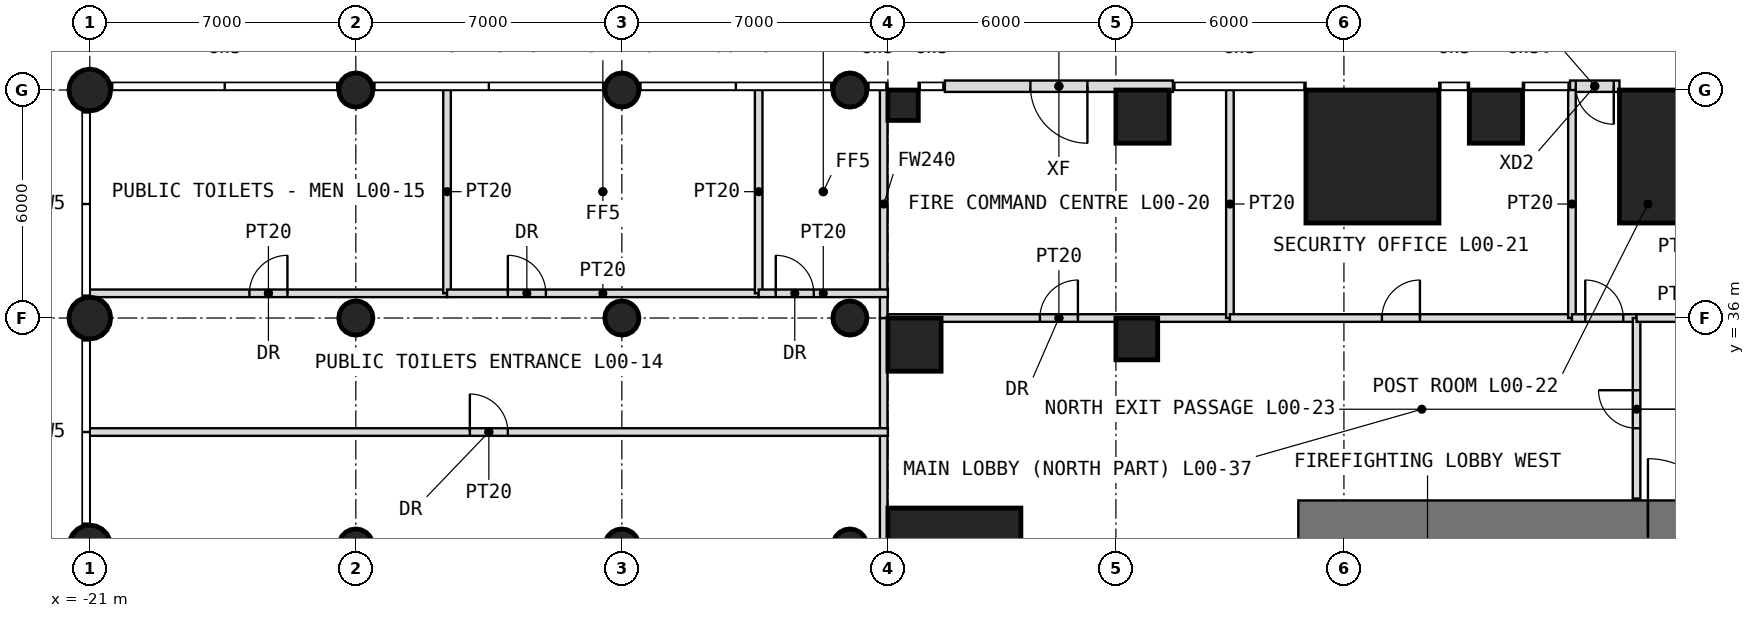
"""IFC4 building model, lengths in metres.
Left out: names, types, materials, properties, quantities, classifications, styles, units other than length and angle.
Written with IfcOpenShell. Run it as: python <this file> out.ifc"""

import sys

from ifc_helpers import new_model, si_unit, direction, frame, frame_2d, origin, origin_2d, place, context, subcontext, project, spatial, rectangle, circle, extrude, element, fill, save


model = new_model("IFC4")
c1 = context("Model", 3, precision=1e-05, world=origin(), true_north=direction((0.0, 1.0)))
c2 = subcontext(c1, "Body", "Model", "MODEL_VIEW")
j1 = project(units=[si_unit("LENGTHUNIT", "METRE"), si_unit("PLANEANGLEUNIT", "RADIAN")], contexts=[c1])
p1 = place(None, origin())
s1 = spatial("IfcSite", under=j1, at=p1, CompositionType="ELEMENT")
p2 = place(p1, origin())
s2 = spatial("IfcBuilding", under=s1, at=p2, CompositionType="ELEMENT")
p3 = place(p2, origin())
s3 = spatial("IfcBuildingStorey", under=s2, at=p3, CompositionType="ELEMENT", Elevation=0.0)
p4 = place(p3, frame((-21.0, 30.0, -0.4), z_axis=(0.0, 0.0, 1.0), x_axis=(1.0, 0.0, 0.0)))
e1 = element("IfcColumn", 1, at=p4, inside=s3, PredefinedType="COLUMN", context=c2, shape_type="SweptSolid", body=[
    extrude(circle(Radius=0.55, at=origin_2d()), origin(), (0.0, 0.0, 1.0), 6.4),
])
for number, where, z_axis, x_axis in (
    (2, (-14.0, 30.0, -0.4), (0.0, 0.0, 1.0), (1.0, 0.0, 0.0)),
    (3, (-7.0, 30.0, -0.4), (0.0, 0.0, 1.0), (1.0, 0.0, 0.0)),
    (4, (-1.0, 30.0, -0.4), (0.0, 0.0, 1.0), (1.0, 0.0, 0.0)),
):
    element("IfcColumn", number, at=place(p3, frame(where, z_axis=z_axis, x_axis=x_axis)), inside=s3, PredefinedType="COLUMN", context=c2, shape_type="SweptSolid", body=[
        extrude(circle(Radius=0.45, at=origin_2d()), origin(), (0.0, 0.0, 1.0), 6.4),
    ])
p5 = place(p3, frame((1.75, 29.25, -0.4), z_axis=(0.0, 0.0, 1.0), x_axis=(1.0, 0.0, 0.0)))
e5 = element("IfcColumn", 5, at=p5, inside=s3, PredefinedType="COLUMN", context=c2, shape_type="SweptSolid", body=[
    extrude(rectangle(XDim=3.5, YDim=3.5, at=origin_2d()), origin(), (0.0, 0.0, 1.0), 6.4),
])
p6 = place(p3, frame((-21.0, 36.0, -0.4), z_axis=(0.0, 0.0, 1.0), x_axis=(1.0, 0.0, 0.0)))
e6 = element("IfcColumn", 6, at=p6, inside=s3, PredefinedType="COLUMN", context=c2, shape_type="SweptSolid", body=[
    extrude(circle(Radius=0.55, at=origin_2d()), origin(), (0.0, 0.0, 1.0), 6.4),
])
for number, where, z_axis, x_axis in (
    (7, (-14.0, 36.0, -0.4), (0.0, 0.0, 1.0), (1.0, 0.0, 0.0)),
    (8, (-7.0, 36.0, -0.4), (0.0, 0.0, 1.0), (1.0, 0.0, 0.0)),
    (9, (-1.0, 36.0, -0.4), (0.0, 0.0, 1.0), (1.0, 0.0, 0.0)),
):
    element("IfcColumn", number, at=place(p3, frame(where, z_axis=z_axis, x_axis=x_axis)), inside=s3, PredefinedType="COLUMN", context=c2, shape_type="SweptSolid", body=[
        extrude(circle(Radius=0.45, at=origin_2d()), origin(), (0.0, 0.0, 1.0), 6.4),
    ])
p7 = place(p3, frame((0.7, 35.3, -0.4), z_axis=(0.0, 0.0, 1.0), x_axis=(1.0, 0.0, 0.0)))
e10 = element("IfcColumn", 10, at=p7, inside=s3, PredefinedType="COLUMN", context=c2, shape_type="SweptSolid", body=[
    extrude(rectangle(XDim=1.4, YDim=1.4, at=origin_2d()), origin(), (0.0, 0.0, 1.0), 6.4),
])
p8 = place(p3, frame((6.55, 35.45, -0.4), z_axis=(0.0, 0.0, 1.0), x_axis=(1.0, 0.0, 0.0)))
e11 = element("IfcColumn", 11, at=p8, inside=s3, PredefinedType="COLUMN", context=c2, shape_type="SweptSolid", body=[
    extrude(rectangle(XDim=1.1, YDim=1.1, at=origin_2d()), origin(), (0.0, 0.0, 1.0), 6.4),
])
p9 = place(p3, frame((-21.0, 42.0, -0.4), z_axis=(0.0, 0.0, 1.0), x_axis=(1.0, 0.0, 0.0)))
e12 = element("IfcColumn", 12, at=p9, inside=s3, PredefinedType="COLUMN", context=c2, shape_type="SweptSolid", body=[
    extrude(circle(Radius=0.55, at=origin_2d()), origin(), (0.0, 0.0, 1.0), 6.4),
])
for number, where, z_axis, x_axis in (
    (13, (-14.0, 42.0, -0.4), (0.0, 0.0, 1.0), (1.0, 0.0, 0.0)),
    (14, (-7.0, 42.0, -0.4), (0.0, 0.0, 1.0), (1.0, 0.0, 0.0)),
    (15, (-1.0, 42.0, -0.4), (0.0, 0.0, 1.0), (1.0, 0.0, 0.0)),
):
    element("IfcColumn", number, at=place(p3, frame(where, z_axis=z_axis, x_axis=x_axis)), inside=s3, PredefinedType="COLUMN", context=c2, shape_type="SweptSolid", body=[
        extrude(circle(Radius=0.45, at=origin_2d()), origin(), (0.0, 0.0, 1.0), 6.4),
    ])
p10 = place(p3, frame((0.4, 41.6, -0.4), z_axis=(0.0, 0.0, 1.0), x_axis=(1.0, 0.0, 0.0)))
e16 = element("IfcColumn", 16, at=p10, inside=s3, PredefinedType="COLUMN", context=c2, shape_type="SweptSolid", body=[
    extrude(rectangle(XDim=0.8, YDim=0.8, at=origin_2d()), origin(), (0.0, 0.0, 1.0), 6.4),
])
p11 = place(p3, frame((6.7, 41.3, -0.4), z_axis=(0.0, 0.0, 1.0), x_axis=(1.0, 0.0, 0.0)))
e17 = element("IfcColumn", 17, at=p11, inside=s3, PredefinedType="COLUMN", context=c2, shape_type="SweptSolid", body=[
    extrude(rectangle(XDim=1.4, YDim=1.4, at=origin_2d()), origin(), (0.0, 0.0, 1.0), 6.4),
])
p12 = place(p3, frame((12.75, 40.25, -0.4), z_axis=(0.0, 0.0, 1.0), x_axis=(1.0, 0.0, 0.0)))
e18 = element("IfcColumn", 18, at=p12, inside=s3, PredefinedType="COLUMN", context=c2, shape_type="SweptSolid", body=[
    extrude(rectangle(XDim=3.5, YDim=3.5, at=origin_2d()), origin(), (0.0, 0.0, 1.0), 6.4),
])
p13 = place(p3, frame((16.0, 41.3, -0.4), z_axis=(0.0, 0.0, 1.0), x_axis=(1.0, 0.0, 0.0)))
e19 = element("IfcColumn", 19, at=p13, inside=s3, PredefinedType="COLUMN", context=c2, shape_type="SweptSolid", body=[
    extrude(rectangle(XDim=1.4, YDim=1.4, at=origin_2d()), origin(), (0.0, 0.0, 1.0), 6.4),
])
p14 = place(p3, frame((21.0, 40.25, -0.4), z_axis=(0.0, 0.0, 1.0), x_axis=(1.0, 0.0, 0.0)))
e20 = element("IfcColumn", 20, at=p14, inside=s3, PredefinedType="COLUMN", context=c2, shape_type="SweptSolid", body=[
    extrude(rectangle(XDim=3.5, YDim=3.5, at=origin_2d()), origin(), (0.0, 0.0, 1.0), 6.4),
])
p15 = place(p3, frame((19.25, 42.1, 0.0), z_axis=(0.0, 0.0, 1.0), x_axis=(-1.0, 0.0, 0.0)))
e21 = element("IfcWall", 21, at=p15, inside=s3, PredefinedType="USERDEFINED", context=c2, shape_type="SweptSolid", body=[
    extrude(rectangle(XDim=1.3, YDim=0.3, at=frame_2d((0.65, 0.0))), origin(), (0.0, 0.0, 1.0), 5.6),
])
p16 = place(p15, frame((0.15, 0.0, 0.0)))
e22 = element("IfcOpeningElement", 22, at=p16, cuts=e21, PredefinedType="OPENING", context=c2, shape_type="SweptSolid", body=[
    extrude(rectangle(XDim=1.0, YDim=2.4, at=frame_2d((0.5, 1.2))), frame((0.0, 0.16, 0.0), z_axis=(0.0, -1.0, 0.0), x_axis=(1.0, 0.0, 0.0)), (0.0, 0.0, 1.0), 0.32),
])
p17 = place(p3, frame((7.5, 42.1, 0.0), z_axis=(0.0, 0.0, 1.0), x_axis=(-1.0, 0.0, 0.0)))
e23 = element("IfcWall", 23, at=p17, inside=s3, PredefinedType="USERDEFINED", context=c2, shape_type="SweptSolid", body=[
    extrude(rectangle(XDim=6.0, YDim=0.3, at=frame_2d((3.0, 0.0))), origin(), (0.0, 0.0, 1.0), 4.98),
])
p18 = place(p17, frame((2.25, 0.0, 0.0)))
e24 = element("IfcOpeningElement", 24, at=p18, cuts=e23, PredefinedType="OPENING", context=c2, shape_type="SweptSolid", body=[
    extrude(rectangle(XDim=1.5, YDim=2.4, at=frame_2d((0.75, 1.2))), frame((0.0, 0.16, 0.0), z_axis=(0.0, -1.0, 0.0), x_axis=(1.0, 0.0, 0.0)), (0.0, 0.0, 1.0), 0.32),
])
p19 = place(p3, frame((10.8, 30.3, 0.0), z_axis=(0.0, 0.0, 1.0), x_axis=(1.0, 0.0, 0.0)))
e25 = element("IfcWall", 25, at=p19, inside=s3, PredefinedType="SHEAR", context=c2, shape_type="SweptSolid", body=[
    extrude(rectangle(XDim=20.4, YDim=1.8, at=frame_2d((10.2, 0.0))), origin(), (0.0, 0.0, 1.0), 5.8),
])
p20 = place(p19, frame((9.2, 0.0, 0.0)))
e26 = element("IfcOpeningElement", 26, at=p20, cuts=e25, PredefinedType="OPENING", context=c2, shape_type="SweptSolid", body=[
    extrude(rectangle(XDim=2.0, YDim=2.2, at=frame_2d((1.0, 1.1))), frame((0.0, 0.91, 0.0), z_axis=(0.0, -1.0, 0.0), x_axis=(1.0, 0.0, 0.0)), (0.0, 0.0, 1.0), 1.82),
])
p21 = place(p3, frame((-0.11, 6.0, 0.0), z_axis=(0.0, 0.0, 1.0), x_axis=(0.0, 1.0, 0.0)))
e27 = element("IfcWall", 27, at=p21, inside=s3, PredefinedType="PARTITIONING", context=c2, shape_type="SweptSolid", body=[
    extrude(rectangle(XDim=30.0, YDim=0.2, at=frame_2d((15.0, 0.0))), origin(), (0.0, 0.0, 1.0), 5.6),
])
p22 = place(p3, frame((-0.11, 36.0, 0.0), z_axis=(0.0, 0.0, 1.0), x_axis=(0.0, 1.0, 0.0)))
e28 = element("IfcWall", 28, at=p22, inside=s3, PredefinedType="PARTITIONING", context=c2, shape_type="SweptSolid", body=[
    extrude(rectangle(XDim=6.0, YDim=0.2, at=frame_2d((3.0, 0.0))), origin(), (0.0, 0.0, 1.0), 4.98),
])
p23 = place(p3, frame((-21.0, 33.0, 0.0), z_axis=(0.0, 0.0, 1.0), x_axis=(1.0, 0.0, 0.0)))
e29 = element("IfcWall", 29, at=p23, inside=s3, PredefinedType="PARTITIONING", context=c2, shape_type="SweptSolid", body=[
    extrude(rectangle(XDim=21.0, YDim=0.2, at=frame_2d((10.5, 0.0))), origin(), (0.0, 0.0, 1.0), 5.6),
])
p24 = place(p23, frame((10.0, 0.0, 0.0)))
e30 = element("IfcOpeningElement", 30, at=p24, cuts=e29, PredefinedType="OPENING", context=c2, shape_type="SweptSolid", body=[
    extrude(rectangle(XDim=1.0, YDim=2.2, at=frame_2d((0.5, 1.1))), frame((0.0, 0.11, 0.0), z_axis=(0.0, -1.0, 0.0), x_axis=(1.0, 0.0, 0.0)), (0.0, 0.0, 1.0), 0.22),
])
p25 = place(p3, frame((-21.0, 36.65, 0.0), z_axis=(0.0, 0.0, 1.0), x_axis=(1.0, 0.0, 0.0)))
e31 = element("IfcWall", 31, at=p25, inside=s3, PredefinedType="PARTITIONING", context=c2, shape_type="SweptSolid", body=[
    extrude(rectangle(XDim=9.4, YDim=0.2, at=frame_2d((4.7, 0.0))), origin(), (0.0, 0.0, 1.0), 5.6),
])
p26 = place(p25, frame((4.2, 0.0, 0.0)))
e32 = element("IfcOpeningElement", 32, at=p26, cuts=e31, PredefinedType="OPENING", context=c2, shape_type="SweptSolid", body=[
    extrude(rectangle(XDim=1.0, YDim=2.2, at=frame_2d((0.5, 1.1))), frame((0.0, 0.11, 0.0), z_axis=(0.0, -1.0, 0.0), x_axis=(1.0, 0.0, 0.0)), (0.0, 0.0, 1.0), 0.22),
])
p27 = place(p3, frame((-11.6, 36.65, 0.0), z_axis=(0.0, 0.0, 1.0), x_axis=(0.0, 1.0, 0.0)))
e33 = element("IfcWall", 33, at=p27, inside=s3, PredefinedType="PARTITIONING", context=c2, shape_type="SweptSolid", body=[
    extrude(rectangle(XDim=5.35, YDim=0.2, at=frame_2d((2.675, 0.0))), origin(), (0.0, 0.0, 1.0), 5.6),
])
p28 = place(p3, frame((-11.6, 36.65, 0.0), z_axis=(0.0, 0.0, 1.0), x_axis=(1.0, 0.0, 0.0)))
e34 = element("IfcWall", 34, at=p28, inside=s3, PredefinedType="PARTITIONING", context=c2, shape_type="SweptSolid", body=[
    extrude(rectangle(XDim=8.2, YDim=0.2, at=frame_2d((4.1, 0.0))), origin(), (0.0, 0.0, 1.0), 5.6),
])
p29 = place(p28, frame((1.6, 0.0, 0.0)))
e35 = element("IfcOpeningElement", 35, at=p29, cuts=e34, PredefinedType="OPENING", context=c2, shape_type="SweptSolid", body=[
    extrude(rectangle(XDim=1.0, YDim=2.2, at=frame_2d((0.5, 1.1))), frame((0.0, 0.11, 0.0), z_axis=(0.0, -1.0, 0.0), x_axis=(1.0, 0.0, 0.0)), (0.0, 0.0, 1.0), 0.22),
])
p30 = place(p3, frame((-3.4, 36.65, 0.0), z_axis=(0.0, 0.0, 1.0), x_axis=(0.0, 1.0, 0.0)))
e36 = element("IfcWall", 36, at=p30, inside=s3, PredefinedType="PARTITIONING", context=c2, shape_type="SweptSolid", body=[
    extrude(rectangle(XDim=5.35, YDim=0.2, at=frame_2d((2.675, 0.0))), origin(), (0.0, 0.0, 1.0), 5.6),
])
p31 = place(p3, frame((-3.4, 36.65, 0.0), z_axis=(0.0, 0.0, 1.0), x_axis=(1.0, 0.0, 0.0)))
e37 = element("IfcWall", 37, at=p31, inside=s3, PredefinedType="PARTITIONING", context=c2, shape_type="SweptSolid", body=[
    extrude(rectangle(XDim=3.4, YDim=0.2, at=frame_2d((1.7, 0.0))), origin(), (0.0, 0.0, 1.0), 5.6),
])
p32 = place(p31, frame((0.45, 0.0, 0.0)))
e38 = element("IfcOpeningElement", 38, at=p32, cuts=e37, PredefinedType="OPENING", context=c2, shape_type="SweptSolid", body=[
    extrude(rectangle(XDim=1.0, YDim=2.2, at=frame_2d((0.5, 1.1))), frame((0.0, 0.11, 0.0), z_axis=(0.0, -1.0, 0.0), x_axis=(1.0, 0.0, 0.0)), (0.0, 0.0, 1.0), 0.22),
])
p33 = place(p3, frame((0.0, 36.0, 0.0), z_axis=(0.0, 0.0, 1.0), x_axis=(1.0, 0.0, 0.0)))
e39 = element("IfcWall", 39, at=p33, inside=s3, PredefinedType="PARTITIONING", context=c2, shape_type="SweptSolid", body=[
    extrude(rectangle(XDim=9.0, YDim=0.2, at=frame_2d((4.5, 0.0))), origin(), (0.0, 0.0, 1.0), 5.6),
])
p34 = place(p33, frame((4.0, 0.0, 0.0)))
e40 = element("IfcOpeningElement", 40, at=p34, cuts=e39, PredefinedType="OPENING", context=c2, shape_type="SweptSolid", body=[
    extrude(rectangle(XDim=1.0, YDim=2.2, at=frame_2d((0.5, 1.1))), frame((0.0, 0.11, 0.0), z_axis=(0.0, -1.0, 0.0), x_axis=(1.0, 0.0, 0.0)), (0.0, 0.0, 1.0), 0.22),
])
p35 = place(p3, frame((9.0, 36.0, 0.0), z_axis=(0.0, 0.0, 1.0), x_axis=(0.0, 1.0, 0.0)))
e41 = element("IfcWall", 41, at=p35, inside=s3, PredefinedType="PARTITIONING", context=c2, shape_type="SweptSolid", body=[
    extrude(rectangle(XDim=6.0, YDim=0.2, at=frame_2d((3.0, 0.0))), origin(), (0.0, 0.0, 1.0), 5.6),
])
p36 = place(p3, frame((9.0, 36.0, 0.0), z_axis=(0.0, 0.0, 1.0), x_axis=(1.0, 0.0, 0.0)))
e42 = element("IfcWall", 42, at=p36, inside=s3, PredefinedType="PARTITIONING", context=c2, shape_type="SweptSolid", body=[
    extrude(rectangle(XDim=9.0, YDim=0.2, at=frame_2d((4.5, 0.0))), origin(), (0.0, 0.0, 1.0), 5.6),
])
p37 = place(p36, frame((4.0, 0.0, 0.0)))
e43 = element("IfcOpeningElement", 43, at=p37, cuts=e42, PredefinedType="OPENING", context=c2, shape_type="SweptSolid", body=[
    extrude(rectangle(XDim=1.0, YDim=2.2, at=frame_2d((0.5, 1.1))), frame((0.0, 0.11, 0.0), z_axis=(0.0, -1.0, 0.0), x_axis=(1.0, 0.0, 0.0)), (0.0, 0.0, 1.0), 0.22),
])
p38 = place(p3, frame((18.0, 36.0, 0.0), z_axis=(0.0, 0.0, 1.0), x_axis=(0.0, 1.0, 0.0)))
e44 = element("IfcWall", 44, at=p38, inside=s3, PredefinedType="PARTITIONING", context=c2, shape_type="SweptSolid", body=[
    extrude(rectangle(XDim=6.0, YDim=0.2, at=frame_2d((3.0, 0.0))), origin(), (0.0, 0.0, 1.0), 5.6),
])
p39 = place(p3, frame((18.0, 36.0, 0.0), z_axis=(0.0, 0.0, 1.0), x_axis=(1.0, 0.0, 0.0)))
e45 = element("IfcWall", 45, at=p39, inside=s3, PredefinedType="PARTITIONING", context=c2, shape_type="SweptSolid", body=[
    extrude(rectangle(XDim=1.7, YDim=0.2, at=frame_2d((0.85, 0.0))), origin(), (0.0, 0.0, 1.0), 5.6),
])
p40 = place(p39, frame((0.35, 0.0, 0.0)))
e46 = element("IfcOpeningElement", 46, at=p40, cuts=e45, PredefinedType="OPENING", context=c2, shape_type="SweptSolid", body=[
    extrude(rectangle(XDim=1.0, YDim=2.2, at=frame_2d((0.5, 1.1))), frame((0.0, 0.11, 0.0), z_axis=(0.0, -1.0, 0.0), x_axis=(1.0, 0.0, 0.0)), (0.0, 0.0, 1.0), 0.22),
])
p41 = place(p3, frame((19.7, 31.25, 0.0), z_axis=(0.0, 0.0, 1.0), x_axis=(0.0, 1.0, 0.0)))
e47 = element("IfcWall", 47, at=p41, inside=s3, PredefinedType="PARTITIONING", context=c2, shape_type="SweptSolid", body=[
    extrude(rectangle(XDim=4.75, YDim=0.2, at=frame_2d((2.375, 0.0))), origin(), (0.0, 0.0, 1.0), 5.6),
])
p42 = place(p41, frame((1.85, 0.0, 0.0)))
e48 = element("IfcOpeningElement", 48, at=p42, cuts=e47, PredefinedType="OPENING", context=c2, shape_type="SweptSolid", body=[
    extrude(rectangle(XDim=1.0, YDim=2.2, at=frame_2d((0.5, 1.1))), frame((0.0, 0.11, 0.0), z_axis=(0.0, -1.0, 0.0), x_axis=(1.0, 0.0, 0.0)), (0.0, 0.0, 1.0), 0.22),
])
p43 = place(p3, frame((19.7, 36.0, 0.0), z_axis=(0.0, 0.0, 1.0), x_axis=(1.0, 0.0, 0.0)))
e49 = element("IfcWall", 49, at=p43, inside=s3, PredefinedType="PARTITIONING", context=c2, shape_type="SweptSolid", body=[
    extrude(rectangle(XDim=2.3, YDim=0.2, at=frame_2d((1.15, 0.0))), origin(), (0.0, 0.0, 1.0), 5.6),
])
p44 = place(p16, origin())
e50 = element("IfcDoor", 50, at=p44, inside=s3, OperationType="SINGLE_SWING_LEFT", PredefinedType="DOOR", context=c2, shape_type="SweptSolid", body=[
    extrude(rectangle(XDim=1.0, YDim=2.4, at=frame_2d((0.5, 1.2))), frame((0.0, 0.025, 0.0), z_axis=(0.0, -1.0, 0.0), x_axis=(1.0, 0.0, 0.0)), (0.0, 0.0, 1.0), 0.05),
])
fill(e22, e50)
p45 = place(p18, origin())
e51 = element("IfcDoor", 51, at=p45, inside=s3, OperationType="DOUBLE_DOOR_SINGLE_SWING", PredefinedType="DOOR", context=c2, shape_type="SweptSolid", body=[
    extrude(rectangle(XDim=1.5, YDim=2.4, at=frame_2d((0.75, 1.2))), frame((0.0, 0.025, 0.0), z_axis=(0.0, -1.0, 0.0), x_axis=(1.0, 0.0, 0.0)), (0.0, 0.0, 1.0), 0.05),
])
fill(e24, e51)
p46 = place(p20, origin())
e52 = element("IfcDoor", 52, at=p46, inside=s3, OperationType="DOUBLE_DOOR_SINGLE_SWING", PredefinedType="DOOR", context=c2, shape_type="SweptSolid", body=[
    extrude(rectangle(XDim=2.0, YDim=2.2, at=frame_2d((1.0, 1.1))), frame((0.0, 0.025, 0.0), z_axis=(0.0, -1.0, 0.0), x_axis=(1.0, 0.0, 0.0)), (0.0, 0.0, 1.0), 0.05),
])
fill(e26, e52)
p47 = place(p24, origin())
e53 = element("IfcDoor", 53, at=p47, inside=s3, OperationType="SINGLE_SWING_LEFT", PredefinedType="DOOR", context=c2, shape_type="SweptSolid", body=[
    extrude(rectangle(XDim=1.0, YDim=2.2, at=frame_2d((0.5, 1.1))), frame((0.0, 0.025, 0.0), z_axis=(0.0, -1.0, 0.0), x_axis=(1.0, 0.0, 0.0)), (0.0, 0.0, 1.0), 0.05),
])
fill(e30, e53)
p48 = place(p26, origin())
e54 = element("IfcDoor", 54, at=p48, inside=s3, OperationType="SINGLE_SWING_RIGHT", PredefinedType="DOOR", context=c2, shape_type="SweptSolid", body=[
    extrude(rectangle(XDim=1.0, YDim=2.2, at=frame_2d((0.5, 1.1))), frame((0.0, 0.025, 0.0), z_axis=(0.0, -1.0, 0.0), x_axis=(1.0, 0.0, 0.0)), (0.0, 0.0, 1.0), 0.05),
])
fill(e32, e54)
p49 = place(p29, origin())
e55 = element("IfcDoor", 55, at=p49, inside=s3, OperationType="SINGLE_SWING_LEFT", PredefinedType="DOOR", context=c2, shape_type="SweptSolid", body=[
    extrude(rectangle(XDim=1.0, YDim=2.2, at=frame_2d((0.5, 1.1))), frame((0.0, 0.025, 0.0), z_axis=(0.0, -1.0, 0.0), x_axis=(1.0, 0.0, 0.0)), (0.0, 0.0, 1.0), 0.05),
])
fill(e35, e55)
p50 = place(p32, origin())
e56 = element("IfcDoor", 56, at=p50, inside=s3, OperationType="SINGLE_SWING_LEFT", PredefinedType="DOOR", context=c2, shape_type="SweptSolid", body=[
    extrude(rectangle(XDim=1.0, YDim=2.2, at=frame_2d((0.5, 1.1))), frame((0.0, 0.025, 0.0), z_axis=(0.0, -1.0, 0.0), x_axis=(1.0, 0.0, 0.0)), (0.0, 0.0, 1.0), 0.05),
])
fill(e38, e56)
p51 = place(p34, origin())
e57 = element("IfcDoor", 57, at=p51, inside=s3, OperationType="SINGLE_SWING_RIGHT", PredefinedType="DOOR", context=c2, shape_type="SweptSolid", body=[
    extrude(rectangle(XDim=1.0, YDim=2.2, at=frame_2d((0.5, 1.1))), frame((0.0, 0.025, 0.0), z_axis=(0.0, -1.0, 0.0), x_axis=(1.0, 0.0, 0.0)), (0.0, 0.0, 1.0), 0.05),
])
fill(e40, e57)
p52 = place(p37, origin())
e58 = element("IfcDoor", 58, at=p52, inside=s3, OperationType="SINGLE_SWING_RIGHT", PredefinedType="DOOR", context=c2, shape_type="SweptSolid", body=[
    extrude(rectangle(XDim=1.0, YDim=2.2, at=frame_2d((0.5, 1.1))), frame((0.0, 0.025, 0.0), z_axis=(0.0, -1.0, 0.0), x_axis=(1.0, 0.0, 0.0)), (0.0, 0.0, 1.0), 0.05),
])
fill(e43, e58)
p53 = place(p40, origin())
e59 = element("IfcDoor", 59, at=p53, inside=s3, OperationType="SINGLE_SWING_LEFT", PredefinedType="DOOR", context=c2, shape_type="SweptSolid", body=[
    extrude(rectangle(XDim=1.0, YDim=2.2, at=frame_2d((0.5, 1.1))), frame((0.0, 0.025, 0.0), z_axis=(0.0, -1.0, 0.0), x_axis=(1.0, 0.0, 0.0)), (0.0, 0.0, 1.0), 0.05),
])
fill(e46, e59)
p54 = place(p42, origin())
e60 = element("IfcDoor", 60, at=p54, inside=s3, OperationType="SINGLE_SWING_RIGHT", PredefinedType="DOOR", context=c2, shape_type="SweptSolid", body=[
    extrude(rectangle(XDim=1.0, YDim=2.2, at=frame_2d((0.5, 1.1))), frame((0.0, 0.025, 0.0), z_axis=(0.0, -1.0, 0.0), x_axis=(1.0, 0.0, 0.0)), (0.0, 0.0, 1.0), 0.05),
])
fill(e48, e60)
save(model, sys.argv[1])
